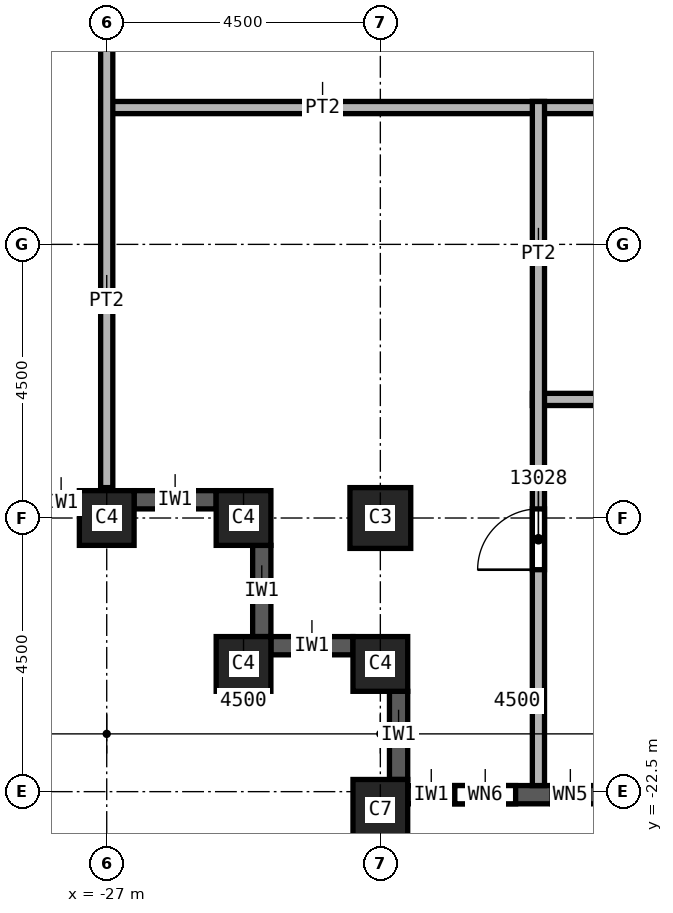
"""IFC4 building model, lengths in metres.
Left out: names, types, materials, properties, quantities, classifications, styles, units other than length and angle.
Written with IfcOpenShell. Run it as: python <this file> out.ifc"""

import sys

from ifc_helpers import new_model, si_unit, direction, frame, frame_2d, origin, origin_2d, place, context, subcontext, project, spatial, rectangle, extrude, element, fill, save


model = new_model("IFC4")
c1 = context("Model", 3, precision=1e-05, world=origin(), true_north=direction((0.0, 1.0)))
c2 = subcontext(c1, "Body", "Model", "MODEL_VIEW")
j1 = project(units=[si_unit("LENGTHUNIT", "METRE"), si_unit("PLANEANGLEUNIT", "RADIAN")], contexts=[c1])
p1 = place(None, origin())
s1 = spatial("IfcSite", under=j1, at=p1, CompositionType="ELEMENT")
p2 = place(p1, origin())
s2 = spatial("IfcBuilding", under=s1, at=p2, CompositionType="ELEMENT")
p3 = place(p2, frame((0.0, 0.0, 208.0)))
s3 = spatial("IfcBuildingStorey", under=s2, at=p3, CompositionType="ELEMENT", Elevation=208.0)
p4 = place(p3, frame((-22.5, -18.0, 0.0), z_axis=(0.0, 0.0, 1.0), x_axis=(1.0, 0.0, 0.0)))
e1 = element("IfcColumn", 1, at=p4, inside=s3, PredefinedType="COLUMN", context=c2, shape_type="SweptSolid", body=[
    extrude(rectangle(XDim=1.0, YDim=1.0, at=origin_2d()), origin(), (0.0, 0.0, 1.0), 3.72),
])
p5 = place(p3, frame((-22.5, -22.8, 0.0), z_axis=(0.0, 0.0, 1.0), x_axis=(1.0, 0.0, 0.0)))
e2 = element("IfcColumn", 2, at=p5, inside=s3, PredefinedType="COLUMN", context=c2, shape_type="SweptSolid", body=[
    extrude(rectangle(XDim=0.9, YDim=1.0, at=origin_2d()), origin(), (0.0, 0.0, 1.0), 3.72),
])
for number, where, z_axis, x_axis in (
    (3, (-27.0, -18.0, 0.0), (0.0, 0.0, 1.0), (1.0, 0.0, 0.0)),
    (4, (-22.5, -20.4, 0.0), (0.0, 0.0, 1.0), (1.0, 0.0, 0.0)),
    (5, (-24.75, -20.4, 0.0), (0.0, 0.0, 1.0), (1.0, 0.0, 0.0)),
    (6, (-24.75, -18.0, 0.0), (0.0, 0.0, 1.0), (1.0, 0.0, 0.0)),
):
    element("IfcColumn", number, at=place(p3, frame(where, z_axis=z_axis, x_axis=x_axis)), inside=s3, PredefinedType="COLUMN", context=c2, shape_type="SweptSolid", body=[
        extrude(rectangle(XDim=0.9, YDim=0.9, at=origin_2d()), origin(), (0.0, 0.0, 1.0), 3.72),
    ])
p6 = place(p3, frame((-31.05, -17.75, 0.0), z_axis=(0.0, 0.0, 1.0), x_axis=(1.0, 0.0, 0.0)))
e7 = element("IfcWall", 7, at=p6, inside=s3, PredefinedType="SOLIDWALL", context=c2, shape_type="SweptSolid", body=[
    extrude(rectangle(XDim=3.6, YDim=0.3, at=frame_2d((1.8, 0.0))), origin(), (0.0, 0.0, 1.0), 3.12),
])
p7 = place(p6, frame((0.6, 0.0, 0.8)))
e8 = element("IfcOpeningElement", 8, at=p7, cuts=e7, PredefinedType="OPENING", context=c2, shape_type="SweptSolid", body=[
    extrude(rectangle(XDim=2.4, YDim=1.95, at=frame_2d((1.2, 0.975))), frame((0.0, 0.15, 0.0), z_axis=(0.0, -1.0, 0.0), x_axis=(1.0, 0.0, 0.0)), (0.0, 0.0, 1.0), 0.3),
])
p8 = place(p3, frame((-26.55, -17.7, 0.0), z_axis=(0.0, 0.0, 1.0), x_axis=(1.0, 0.0, 0.0)))
e9 = element("IfcWall", 9, at=p8, inside=s3, PredefinedType="SOLIDWALL", context=c2, shape_type="SweptSolid", body=[
    extrude(rectangle(XDim=1.35, YDim=0.3, at=frame_2d((0.675, 0.0))), origin(), (0.0, 0.0, 1.0), 3.12),
])
p9 = place(p3, frame((-24.45, -18.45, 0.0), z_axis=(0.0, 0.0, 1.0), x_axis=(0.0, -1.0, 0.0)))
e10 = element("IfcWall", 10, at=p9, inside=s3, PredefinedType="SOLIDWALL", context=c2, shape_type="SweptSolid", body=[
    extrude(rectangle(XDim=1.5, YDim=0.3, at=frame_2d((0.75, 0.0))), origin(), (0.0, 0.0, 1.0), 3.12),
])
p10 = place(p3, frame((-24.3, -20.1, 0.0), z_axis=(0.0, 0.0, 1.0), x_axis=(1.0, 0.0, 0.0)))
e11 = element("IfcWall", 11, at=p10, inside=s3, PredefinedType="SOLIDWALL", context=c2, shape_type="SweptSolid", body=[
    extrude(rectangle(XDim=1.35, YDim=0.3, at=frame_2d((0.675, 0.0))), origin(), (0.0, 0.0, 1.0), 3.12),
])
p11 = place(p3, frame((-22.2, -20.85, 0.0), z_axis=(0.0, 0.0, 1.0), x_axis=(0.0, -1.0, 0.0)))
e12 = element("IfcWall", 12, at=p11, inside=s3, PredefinedType="SOLIDWALL", context=c2, shape_type="SweptSolid", body=[
    extrude(rectangle(XDim=1.45, YDim=0.3, at=frame_2d((0.725, 0.0))), origin(), (0.0, 0.0, 1.0), 3.12),
])
p12 = place(p3, frame((-22.05, -22.55, 0.0), z_axis=(0.0, 0.0, 1.0), x_axis=(1.0, 0.0, 0.0)))
e13 = element("IfcWall", 13, at=p12, inside=s3, PredefinedType="SOLIDWALL", context=c2, shape_type="SweptSolid", body=[
    extrude(rectangle(XDim=3.6, YDim=0.3, at=frame_2d((1.8, 0.0))), origin(), (0.0, 0.0, 1.0), 3.12),
])
p13 = place(p12, frame((0.775, 0.0, 0.8)))
e14 = element("IfcOpeningElement", 14, at=p13, cuts=e13, PredefinedType="OPENING", context=c2, shape_type="SweptSolid", body=[
    extrude(rectangle(XDim=1.0, YDim=1.95, at=frame_2d((0.5, 0.975))), frame((0.0, 0.15, 0.0), z_axis=(0.0, -1.0, 0.0), x_axis=(1.0, 0.0, 0.0)), (0.0, 0.0, 1.0), 0.3),
])
p14 = place(p12, frame((2.375, 0.0, 0.8)))
e15 = element("IfcOpeningElement", 15, at=p14, cuts=e13, PredefinedType="OPENING", context=c2, shape_type="SweptSolid", body=[
    extrude(rectangle(XDim=0.6, YDim=1.95, at=frame_2d((0.3, 0.975))), frame((0.0, 0.15, 0.0), z_axis=(0.0, -1.0, 0.0), x_axis=(1.0, 0.0, 0.0)), (0.0, 0.0, 1.0), 0.3),
])
p15 = place(p3, frame((-27.1, -11.25, 0.0), z_axis=(0.0, 0.0, 1.0), x_axis=(1.0, 0.0, 0.0)))
e16 = element("IfcWall", 16, at=p15, inside=s3, PredefinedType="PARTITIONING", context=c2, shape_type="SweptSolid", body=[
    extrude(rectangle(XDim=11.7, YDim=0.2, at=frame_2d((5.85, 0.0))), origin(), (0.0, 0.0, 1.0), 3.72),
])
p16 = place(p3, frame((-27.0, -17.5, 0.0), z_axis=(0.0, 0.0, 1.0), x_axis=(0.0, 1.0, 0.0)))
e17 = element("IfcWall", 17, at=p16, inside=s3, PredefinedType="PARTITIONING", context=c2, shape_type="SweptSolid", body=[
    extrude(rectangle(XDim=18.25, YDim=0.2, at=frame_2d((9.125, 0.0))), origin(), (0.0, 0.0, 1.0), 3.72),
])
p17 = place(p3, frame((-20.0, -16.05, 0.0), z_axis=(0.0, 0.0, 1.0), x_axis=(1.0, 0.0, 0.0)))
e18 = element("IfcWall", 18, at=p17, inside=s3, PredefinedType="PARTITIONING", context=c2, shape_type="SweptSolid", body=[
    extrude(rectangle(XDim=4.6, YDim=0.2, at=frame_2d((2.3, 0.0))), origin(), (0.0, 0.0, 1.0), 3.72),
])
p18 = place(p3, frame((-19.9, -22.4, 0.0), z_axis=(0.0, 0.0, 1.0), x_axis=(0.0, 1.0, 0.0)))
e19 = element("IfcWall", 19, at=p18, inside=s3, PredefinedType="PARTITIONING", context=c2, shape_type="SweptSolid", body=[
    extrude(rectangle(XDim=11.25, YDim=0.2, at=frame_2d((5.625, 0.0))), origin(), (0.0, 0.0, 1.0), 3.72),
])
p19 = place(p18, frame((3.55, 0.0, 0.0)))
e20 = element("IfcOpeningElement", 20, at=p19, cuts=e19, PredefinedType="OPENING", context=c2, shape_type="SweptSolid", body=[
    extrude(rectangle(XDim=1.0, YDim=2.1, at=frame_2d((0.5, 1.05))), frame((0.0, 0.1, 0.0), z_axis=(0.0, -1.0, 0.0), x_axis=(1.0, 0.0, 0.0)), (0.0, 0.0, 1.0), 0.2),
])
p20 = place(p19, origin())
e21 = element("IfcDoor", 21, at=p20, inside=s3, OperationType="SINGLE_SWING_LEFT", PredefinedType="DOOR", context=c2, shape_type="SweptSolid", body=[
    extrude(rectangle(XDim=1.0, YDim=2.1, at=frame_2d((0.5, 1.05))), frame((0.0, 0.025, 0.0), z_axis=(0.0, -1.0, 0.0), x_axis=(1.0, 0.0, 0.0)), (0.0, 0.0, 1.0), 0.05),
])
fill(e20, e21)
p21 = place(p13, origin())
e22 = element("IfcWindow", 22, at=p21, inside=s3, PartitioningType="SINGLE_PANEL", PredefinedType="WINDOW", context=c2, shape_type="SweptSolid", body=[
    extrude(rectangle(XDim=1.0, YDim=1.95, at=frame_2d((0.5, 0.975))), frame((0.0, 0.03, 0.0), z_axis=(0.0, -1.0, 0.0), x_axis=(1.0, 0.0, 0.0)), (0.0, 0.0, 1.0), 0.06),
])
fill(e14, e22)
p22 = place(p14, origin())
e23 = element("IfcWindow", 23, at=p22, inside=s3, PartitioningType="SINGLE_PANEL", PredefinedType="WINDOW", context=c2, shape_type="SweptSolid", body=[
    extrude(rectangle(XDim=0.6, YDim=1.95, at=frame_2d((0.3, 0.975))), frame((0.0, 0.03, 0.0), z_axis=(0.0, -1.0, 0.0), x_axis=(1.0, 0.0, 0.0)), (0.0, 0.0, 1.0), 0.06),
])
fill(e15, e23)
save(model, sys.argv[1])
